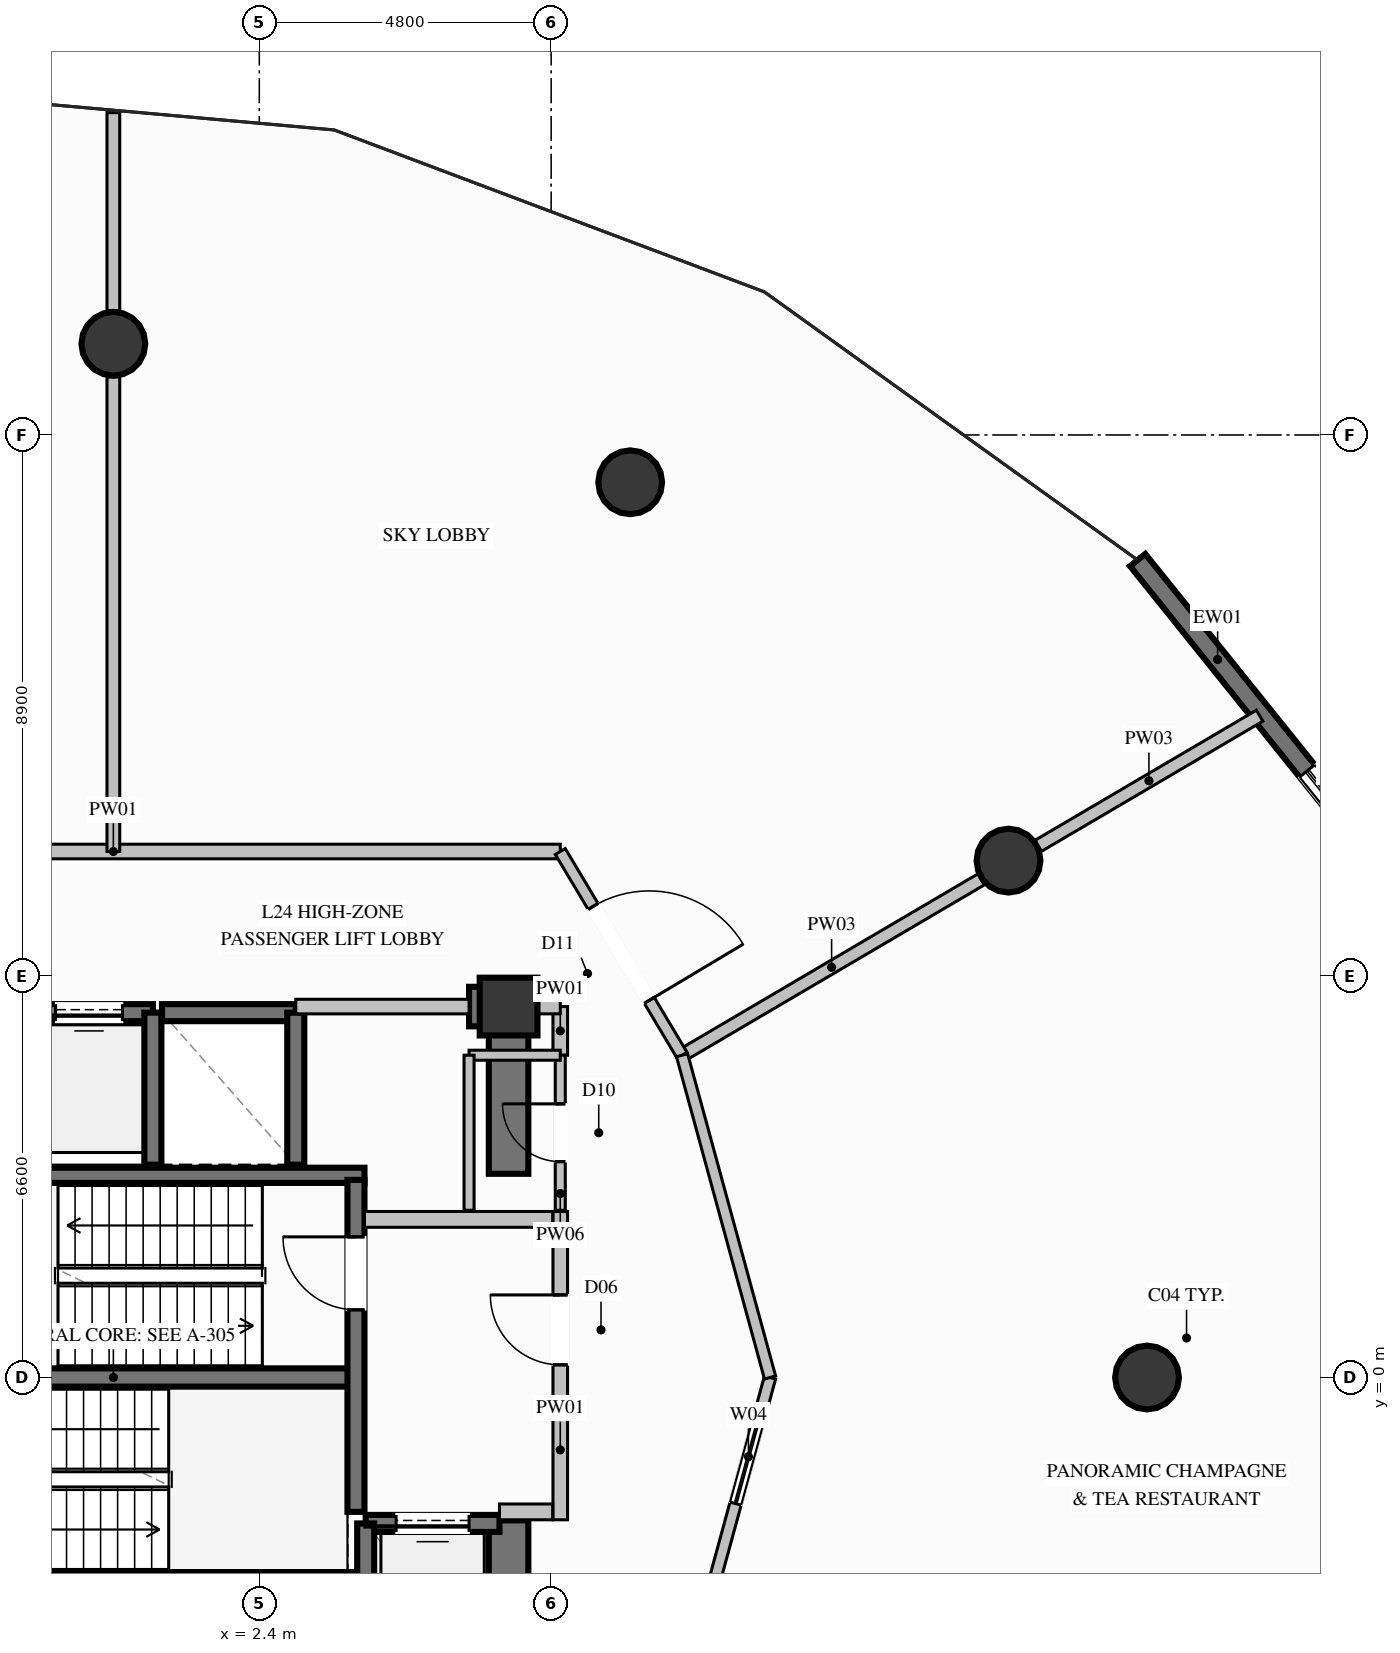
"""IFC4 building model, lengths in metres.
Left out: names, types, materials, properties, quantities, classifications, styles, units other than length and angle.
Written with IfcOpenShell. Run it as: python <this file> out.ifc"""

import sys

from ifc_helpers import new_model, si_unit, direction, frame, frame_2d, origin, origin_2d, place, context, subcontext, project, spatial, rectangle, circle, extrude, element, fill, save


model = new_model("IFC4")
c1 = context("Model", 3, precision=1e-05, world=origin(), true_north=direction((0.0, 1.0)))
c2 = subcontext(c1, "Body", "Model", "MODEL_VIEW")
j1 = project(units=[si_unit("LENGTHUNIT", "METRE"), si_unit("PLANEANGLEUNIT", "RADIAN")], contexts=[c1])
p1 = place(None, origin())
s1 = spatial("IfcSite", under=j1, at=p1, CompositionType="ELEMENT")
p2 = place(p1, origin())
s2 = spatial("IfcBuilding", under=s1, at=p2, CompositionType="ELEMENT")
p3 = place(p2, frame((0.0, 0.0, 98.0)))
s3 = spatial("IfcBuildingStorey", under=s2, at=p3, CompositionType="ELEMENT", Elevation=98.0)
p4 = place(p3, frame((6.5, 6.1, 0.0), z_axis=(0.0, 0.0, 1.0), x_axis=(1.0, 0.0, 0.0)))
e1 = element("IfcColumn", 1, at=p4, inside=s3, PredefinedType="COLUMN", context=c2, shape_type="SweptSolid", body=[
    extrude(rectangle(XDim=0.95, YDim=0.95, at=origin_2d()), origin(), (0.0, 0.0, 1.0), 4.6),
])
p5 = place(p3, frame((-3.99, 0.0, 0.0), z_axis=(0.0, 0.0, 1.0), x_axis=(1.0, 0.0, 0.0)))
e2 = element("IfcWall", 2, at=p5, inside=s3, PredefinedType="SHEAR", context=c2, shape_type="SweptSolid", body=[
    extrude(rectangle(XDim=7.98, YDim=0.3, at=frame_2d((3.99, 0.0))), origin(), (0.0, 0.0, 1.0), 4.6),
])
for number, where, z_axis, x_axis in (
    (3, (-4.13, -3.325, 0.0), (0.0, 0.0, 1.0), (1.0, 0.0, 0.0)),
    (4, (-4.13, 3.325, 0.0), (0.0, 0.0, 1.0), (1.0, 0.0, 0.0)),
):
    element("IfcWall", number, at=place(p3, frame(where, z_axis=z_axis, x_axis=x_axis)), inside=s3, PredefinedType="SOLIDWALL", context=c2, shape_type="SweptSolid", body=[
        extrude(rectangle(XDim=8.26, YDim=0.25, at=frame_2d((4.13, 0.0))), origin(), (0.0, 0.0, 1.0), 4.6),
    ])
p6 = place(p3, frame((5.85, 6.1, 0.0), z_axis=(0.0, 0.0, 1.0), x_axis=(1.0, 0.0, 0.0)))
e5 = element("IfcWall", 5, at=p6, inside=s3, PredefinedType="SHEAR", context=c2, shape_type="SweptSolid", body=[
    extrude(rectangle(XDim=0.325, YDim=0.65, at=frame_2d((0.163, 0.0))), origin(), (0.0, 0.0, 1.0), 4.6),
])
p7 = place(p3, frame((6.5, -6.425, 0.0), z_axis=(0.0, 0.0, 1.0), x_axis=(0.0, 1.0, 0.0)))
e6 = element("IfcWall", 6, at=p7, inside=s3, PredefinedType="SHEAR", context=c2, shape_type="SweptSolid", body=[
    extrude(rectangle(XDim=4.075, YDim=0.65, at=frame_2d((2.038, 0.0))), origin(), (0.0, 0.0, 1.0), 4.6),
])
p8 = place(p3, frame((6.5, 3.35, 0.0), z_axis=(0.0, 0.0, 1.0), x_axis=(0.0, 1.0, 0.0)))
e7 = element("IfcWall", 7, at=p8, inside=s3, PredefinedType="SHEAR", context=c2, shape_type="SweptSolid", body=[
    extrude(rectangle(XDim=3.075, YDim=0.65, at=frame_2d((1.538, 0.0))), origin(), (0.0, 0.0, 1.0), 4.6),
])
for number, where, z_axis, x_axis in (
    (8, (17.0, 0.0, 0.0), (0.0, 0.0, 1.0), (1.0, 0.0, 0.0)),
    (9, (14.722, 8.5, 0.0), (0.0, 0.0, 1.0), (1.0, 0.0, 0.0)),
    (10, (8.5, 14.722, 0.0), (0.0, 0.0, 1.0), (1.0, 0.0, 0.0)),
    (11, (0.0, 17.0, 0.0), (0.0, 0.0, 1.0), (1.0, 0.0, 0.0)),
):
    element("IfcColumn", number, at=place(p3, frame(where, z_axis=z_axis, x_axis=x_axis)), inside=s3, PredefinedType="COLUMN", context=c2, shape_type="SweptSolid", body=[
        extrude(circle(Radius=0.525, at=origin_2d()), origin(), (0.0, 0.0, 1.0), 4.6),
    ])
p9 = place(p3, frame((16.846, 13.443, 0.0), z_axis=(0.0, 0.0, 1.0), x_axis=(0.626452409109, -0.77945967126, 0.0)))
e12 = element("IfcWall", 12, at=p9, inside=s3, PredefinedType="SOLIDWALL", context=c2, shape_type="SweptSolid", body=[
    extrude(rectangle(XDim=7.346, YDim=0.32, at=frame_2d((3.673, 0.0))), origin(), (0.0, 0.0, 1.0), 4.35),
])
p10 = place(p9, frame((4.449, 0.0, 0.6)))
e13 = element("IfcOpeningElement", 13, at=p10, cuts=e12, PredefinedType="OPENING", context=c2, shape_type="SweptSolid", body=[
    extrude(rectangle(XDim=1.8, YDim=2.2, at=frame_2d((0.9, 1.1))), frame((0.0, 0.17, 0.0), z_axis=(0.0, -1.0, 0.0), x_axis=(1.0, 0.0, 0.0)), (0.0, 0.0, 1.0), 0.34),
])
p11 = place(p3, frame((0.65, 6.0, 0.0), z_axis=(0.0, 0.0, 1.0), x_axis=(-1.0, 0.0, 0.0)))
e14 = element("IfcWall", 14, at=p11, inside=s3, PredefinedType="SOLIDWALL", context=c2, shape_type="SweptSolid", body=[
    extrude(rectangle(XDim=2.1, YDim=0.28, at=frame_2d((1.05, 0.0))), origin(), (0.0, 0.0, 1.0), 4.35),
])
p12 = place(p11, frame((0.5, 0.0, 0.0)))
e15 = element("IfcOpeningElement", 15, at=p12, cuts=e14, PredefinedType="OPENING", context=c2, shape_type="SweptSolid", body=[
    extrude(rectangle(XDim=1.1, YDim=2.2, at=frame_2d((0.55, 1.1))), frame((0.0, 0.15, 0.0), z_axis=(0.0, -1.0, 0.0), x_axis=(1.0, 0.0, 0.0)), (0.0, 0.0, 1.0), 0.3),
])
p13 = place(p3, frame((0.65, 3.5, 0.0), z_axis=(0.0, 0.0, 1.0), x_axis=(0.0, 1.0, 0.0)))
e16 = element("IfcWall", 16, at=p13, inside=s3, PredefinedType="SOLIDWALL", context=c2, shape_type="SweptSolid", body=[
    extrude(rectangle(XDim=2.5, YDim=0.28, at=frame_2d((1.25, 0.0))), origin(), (0.0, 0.0, 1.0), 4.35),
])
p14 = place(p3, frame((3.0, 6.0, 0.0), z_axis=(0.0, 0.0, 1.0), x_axis=(-1.0, 0.0, 0.0)))
e17 = element("IfcWall", 17, at=p14, inside=s3, PredefinedType="SOLIDWALL", context=c2, shape_type="SweptSolid", body=[
    extrude(rectangle(XDim=2.2, YDim=0.28, at=frame_2d((1.1, 0.0))), origin(), (0.0, 0.0, 1.0), 4.35),
])
p15 = place(p3, frame((3.0, 3.5, 0.0), z_axis=(0.0, 0.0, 1.0), x_axis=(0.0, 1.0, 0.0)))
e18 = element("IfcWall", 18, at=p15, inside=s3, PredefinedType="SOLIDWALL", context=c2, shape_type="SweptSolid", body=[
    extrude(rectangle(XDim=2.5, YDim=0.28, at=frame_2d((1.25, 0.0))), origin(), (0.0, 0.0, 1.0), 4.35),
])
p16 = place(p3, frame((6.35, -2.4, 0.0), z_axis=(0.0, 0.0, 1.0), x_axis=(-1.0, 0.0, 0.0)))
e19 = element("IfcWall", 19, at=p16, inside=s3, PredefinedType="SOLIDWALL", context=c2, shape_type="SweptSolid", body=[
    extrude(rectangle(XDim=2.2, YDim=0.28, at=frame_2d((1.1, 0.0))), origin(), (0.0, 0.0, 1.0), 4.35),
])
p17 = place(p16, frame((0.5, 0.0, 0.0)))
e20 = element("IfcOpeningElement", 20, at=p17, cuts=e19, PredefinedType="OPENING", context=c2, shape_type="SweptSolid", body=[
    extrude(rectangle(XDim=1.2, YDim=2.2, at=frame_2d((0.6, 1.1))), frame((0.0, 0.15, 0.0), z_axis=(0.0, -1.0, 0.0), x_axis=(1.0, 0.0, 0.0)), (0.0, 0.0, 1.0), 0.3),
])
p18 = place(p3, frame((4.15, -2.4, 0.0), z_axis=(0.0, 0.0, 1.0), x_axis=(0.0, -1.0, 0.0)))
e21 = element("IfcWall", 21, at=p18, inside=s3, PredefinedType="SOLIDWALL", context=c2, shape_type="SweptSolid", body=[
    extrude(rectangle(XDim=2.7, YDim=0.28, at=frame_2d((1.35, 0.0))), origin(), (0.0, 0.0, 1.0), 4.35),
])
p19 = place(p3, frame((3.99, -2.21, 0.0), z_axis=(0.0, 0.0, 1.0), x_axis=(0.0, 1.0, 0.0)))
e22 = element("IfcWall", 22, at=p19, inside=s3, PredefinedType="SOLIDWALL", context=c2, shape_type="SweptSolid", body=[
    extrude(rectangle(XDim=5.46, YDim=0.28, at=frame_2d((2.73, 0.0))), origin(), (0.0, 0.0, 1.0), 4.35),
])
p20 = place(p19, frame((3.323, 0.0, 0.0)))
e23 = element("IfcOpeningElement", 23, at=p20, cuts=e22, PredefinedType="OPENING", context=c2, shape_type="SweptSolid", body=[
    extrude(rectangle(XDim=1.2, YDim=2.2, at=frame_2d((0.6, 1.1))), frame((0.0, 0.15, 0.0), z_axis=(0.0, -1.0, 0.0), x_axis=(1.0, 0.0, 0.0)), (0.0, 0.0, 1.0), 0.3),
])
p21 = place(p3, frame((7.35, -2.34, 0.0), z_axis=(0.0, 0.0, 1.0), x_axis=(0.0, 1.0, 0.0)))
e24 = element("IfcWall", 24, at=p21, inside=s3, PredefinedType="PARTITIONING", context=c2, shape_type="SweptSolid", body=[
    extrude(rectangle(XDim=5.07, YDim=0.24, at=frame_2d((2.535, 0.0))), origin(), (0.0, 0.0, 1.0), 3.235),
])
p22 = place(p21, frame((2.548, 0.0, 0.0)))
e25 = element("IfcOpeningElement", 25, at=p22, cuts=e24, PredefinedType="OPENING", context=c2, shape_type="SweptSolid", body=[
    extrude(rectangle(XDim=1.15, YDim=2.2, at=frame_2d((0.575, 1.1))), frame((0.0, 0.13, 0.0), z_axis=(0.0, -1.0, 0.0), x_axis=(1.0, 0.0, 0.0)), (0.0, 0.0, 1.0), 0.26),
])
p23 = place(p3, frame((6.35, -2.21, 0.0), z_axis=(0.0, 0.0, 1.0), x_axis=(1.0, 0.0, 0.0)))
e26 = element("IfcWall", 26, at=p23, inside=s3, PredefinedType="PARTITIONING", context=c2, shape_type="SweptSolid", body=[
    extrude(rectangle(XDim=0.875, YDim=0.26, at=frame_2d((0.438, 0.0))), origin(), (0.0, 0.0, 1.0), 4.35),
])
p24 = place(p3, frame((4.13, 2.6, 0.0), z_axis=(0.0, 0.0, 1.0), x_axis=(1.0, 0.0, 0.0)))
e27 = element("IfcWall", 27, at=p24, inside=s3, PredefinedType="PARTITIONING", context=c2, shape_type="SweptSolid", body=[
    extrude(rectangle(XDim=3.095, YDim=0.26, at=frame_2d((1.548, 0.0))), origin(), (0.0, 0.0, 1.0), 4.35),
])
p25 = place(p3, frame((-7.35, 8.65, 0.0), z_axis=(0.0, 0.0, 1.0), x_axis=(1.0, 0.0, 0.0)))
e28 = element("IfcWall", 28, at=p25, inside=s3, PredefinedType="PARTITIONING", context=c2, shape_type="SweptSolid", body=[
    extrude(rectangle(XDim=14.7, YDim=0.24, at=frame_2d((7.35, 0.0))), origin(), (0.0, 0.0, 1.0), 4.35),
])
p26 = place(p3, frame((3.0, 6.1, 0.0), z_axis=(0.0, 0.0, 1.0), x_axis=(1.0, 0.0, 0.0)))
e29 = element("IfcWall", 29, at=p26, inside=s3, PredefinedType="PARTITIONING", context=c2, shape_type="SweptSolid", body=[
    extrude(rectangle(XDim=2.85, YDim=0.24, at=frame_2d((1.425, 0.0))), origin(), (0.0, 0.0, 1.0), 3.235),
])
p27 = place(p3, frame((7.35, 5.3, 0.0), z_axis=(0.0, 0.0, 1.0), x_axis=(0.0, 1.0, 0.0)))
e30 = element("IfcWall", 30, at=p27, inside=s3, PredefinedType="PARTITIONING", context=c2, shape_type="SweptSolid", body=[
    extrude(rectangle(XDim=0.8, YDim=0.24, at=frame_2d((0.4, 0.0))), origin(), (0.0, 0.0, 1.0), 3.235),
])
p28 = place(p3, frame((6.5, 6.1, 0.0), z_axis=(0.0, 0.0, 1.0), x_axis=(1.0, 0.0, 0.0)))
e31 = element("IfcWall", 31, at=p28, inside=s3, PredefinedType="PARTITIONING", context=c2, shape_type="SweptSolid", body=[
    extrude(rectangle(XDim=0.85, YDim=0.24, at=frame_2d((0.425, 0.0))), origin(), (0.0, 0.0, 1.0), 3.718),
])
p29 = place(p3, frame((7.35, 2.75, 0.0), z_axis=(0.0, 0.0, 1.0), x_axis=(0.0, 1.0, 0.0)))
e32 = element("IfcWall", 32, at=p29, inside=s3, PredefinedType="PARTITIONING", context=c2, shape_type="SweptSolid", body=[
    extrude(rectangle(XDim=2.55, YDim=0.165, at=frame_2d((1.275, 0.0))), origin(), (0.0, 0.0, 1.0), 3.235),
])
p30 = place(p29, frame((0.8, 0.0, 0.0)))
e33 = element("IfcOpeningElement", 33, at=p30, cuts=e32, PredefinedType="OPENING", context=c2, shape_type="SweptSolid", body=[
    extrude(rectangle(XDim=0.95, YDim=2.1, at=frame_2d((0.475, 1.05))), frame((0.0, 0.093, 0.0), z_axis=(0.0, -1.0, 0.0), x_axis=(1.0, 0.0, 0.0)), (0.0, 0.0, 1.0), 0.185),
])
p31 = place(p3, frame((7.35, 5.3, 0.0), z_axis=(0.0, 0.0, 1.0), x_axis=(-1.0, 0.0, 0.0)))
e34 = element("IfcWall", 34, at=p31, inside=s3, PredefinedType="PARTITIONING", context=c2, shape_type="SweptSolid", body=[
    extrude(rectangle(XDim=1.5, YDim=0.165, at=frame_2d((0.75, 0.0))), origin(), (0.0, 0.0, 1.0), 3.235),
])
p32 = place(p3, frame((5.85, 5.3, 0.0), z_axis=(0.0, 0.0, 1.0), x_axis=(0.0, -1.0, 0.0)))
e35 = element("IfcWall", 35, at=p32, inside=s3, PredefinedType="PARTITIONING", context=c2, shape_type="SweptSolid", body=[
    extrude(rectangle(XDim=2.55, YDim=0.165, at=frame_2d((1.275, 0.0))), origin(), (0.0, 0.0, 1.0), 3.235),
])
p33 = place(p3, frame((9.353, 5.3, 0.0), z_axis=(0.0, 0.0, 1.0), x_axis=(0.862060677735, 0.506805078805, 0.0)))
e36 = element("IfcWall", 36, at=p33, inside=s3, PredefinedType="PARTITIONING", context=c2, shape_type="SweptSolid", body=[
    extrude(rectangle(XDim=5.706, YDim=0.21, at=frame_2d((2.853, 0.0))), origin(), (0.0, 0.0, 1.0), 3.718),
])
p34 = place(p3, frame((15.21, 8.743, 0.0), z_axis=(0.0, 0.0, 1.0), x_axis=(0.86206788284, 0.506792822932, 0.0)))
e37 = element("IfcWall", 37, at=p34, inside=s3, PredefinedType="PARTITIONING", context=c2, shape_type="SweptSolid", body=[
    extrude(rectangle(XDim=4.225, YDim=0.21, at=frame_2d((2.112, 0.0))), origin(), (0.0, 0.0, 1.0), 4.35),
])
p35 = place(p3, frame((7.35, 8.65, 0.0), z_axis=(0.0, 0.0, 1.0), x_axis=(0.513179710324, -0.858281180565, 0.0)))
e38 = element("IfcWall", 38, at=p35, inside=s3, PredefinedType="PARTITIONING", context=c2, shape_type="SweptSolid", body=[
    extrude(rectangle(XDim=3.903, YDim=0.19, at=frame_2d((1.952, 0.0))), origin(), (0.0, 0.0, 1.0), 4.35),
])
p36 = place(p35, frame((1.052, 0.0, 0.0)))
e39 = element("IfcOpeningElement", 39, at=p36, cuts=e38, PredefinedType="OPENING", context=c2, shape_type="SweptSolid", body=[
    extrude(rectangle(XDim=1.8, YDim=2.4, at=frame_2d((0.9, 1.2))), frame((0.0, 0.105, 0.0), z_axis=(0.0, -1.0, 0.0), x_axis=(1.0, 0.0, 0.0)), (0.0, 0.0, 1.0), 0.21),
])
p37 = place(p3, frame((0.0, 8.65, 0.0), z_axis=(0.0, 0.0, 1.0), x_axis=(0.0, 1.0, 0.0)))
e40 = element("IfcWall", 40, at=p37, inside=s3, PredefinedType="PARTITIONING", context=c2, shape_type="SweptSolid", body=[
    extrude(rectangle(XDim=7.805, YDim=0.21, at=frame_2d((3.903, 0.0))), origin(), (0.0, 0.0, 1.0), 4.35),
])
p38 = place(p3, frame((0.0, 17.545, 0.0), z_axis=(0.0, 0.0, 1.0), x_axis=(0.0, 1.0, 0.0)))
e41 = element("IfcWall", 41, at=p38, inside=s3, PredefinedType="PARTITIONING", context=c2, shape_type="SweptSolid", body=[
    extrude(rectangle(XDim=3.256, YDim=0.21, at=frame_2d((1.628, 0.0))), origin(), (0.0, 0.0, 1.0), 4.35),
])
p39 = place(p3, frame((9.353, -5.3, 0.0), z_axis=(0.0, 0.0, 1.0), x_axis=(0.263380602271, 0.964692001805, 0.0)))
e42 = element("IfcWall", 42, at=p39, inside=s3, PredefinedType="PARTITIONING", context=c2, shape_type="SweptSolid", body=[
    extrude(rectangle(XDim=5.494, YDim=0.19, at=frame_2d((2.747, 0.0))), origin(), (0.0, 0.0, 1.0), 4.35),
])
p40 = place(p39, frame((0.55, 0.0, 0.0)))
e43 = element("IfcOpeningElement", 43, at=p40, cuts=e42, PredefinedType="OPENING", context=c2, shape_type="SweptSolid", body=[
    extrude(rectangle(XDim=0.95, YDim=2.1, at=frame_2d((0.475, 1.05))), frame((0.0, 0.105, 0.0), z_axis=(0.0, -1.0, 0.0), x_axis=(1.0, 0.0, 0.0)), (0.0, 0.0, 1.0), 0.21),
])
p41 = place(p39, frame((3.344, 0.0, 0.9)))
e44 = element("IfcOpeningElement", 44, at=p41, cuts=e42, PredefinedType="OPENING", context=c2, shape_type="SweptSolid", body=[
    extrude(rectangle(XDim=1.6, YDim=1.4, at=frame_2d((0.8, 0.7))), frame((0.0, 0.105, 0.0), z_axis=(0.0, -1.0, 0.0), x_axis=(1.0, 0.0, 0.0)), (0.0, 0.0, 1.0), 0.21),
])
p42 = place(p3, frame((10.8, 0.0, 0.0), z_axis=(0.0, 0.0, 1.0), x_axis=(-0.263380602271, 0.964692001805, 0.0)))
e45 = element("IfcWall", 45, at=p42, inside=s3, PredefinedType="PARTITIONING", context=c2, shape_type="SweptSolid", body=[
    extrude(rectangle(XDim=5.494, YDim=0.19, at=frame_2d((2.747, 0.0))), origin(), (0.0, 0.0, 1.0), 4.35),
])
p43 = place(p10, origin())
e46 = element("IfcWindow", 46, at=p43, inside=s3, PartitioningType="SINGLE_PANEL", PredefinedType="SKYLIGHT", context=c2, shape_type="SweptSolid", body=[
    extrude(rectangle(XDim=1.8, YDim=2.2, at=frame_2d((0.9, 1.1))), frame((0.0, 0.03, 0.0), z_axis=(0.0, -1.0, 0.0), x_axis=(1.0, 0.0, 0.0)), (0.0, 0.0, 1.0), 0.06),
])
fill(e13, e46)
p44 = place(p12, origin())
e47 = element("IfcDoor", 47, at=p44, inside=s3, OperationType="SLIDING_TO_LEFT", PredefinedType="DOOR", context=c2, shape_type="SweptSolid", body=[
    extrude(rectangle(XDim=1.1, YDim=2.2, at=frame_2d((0.55, 1.1))), frame((0.0, 0.025, 0.0), z_axis=(0.0, -1.0, 0.0), x_axis=(1.0, 0.0, 0.0)), (0.0, 0.0, 1.0), 0.05),
])
fill(e15, e47)
p45 = place(p17, origin())
e48 = element("IfcDoor", 48, at=p45, inside=s3, OperationType="SLIDING_TO_LEFT", PredefinedType="DOOR", context=c2, shape_type="SweptSolid", body=[
    extrude(rectangle(XDim=1.2, YDim=2.2, at=frame_2d((0.6, 1.1))), frame((0.0, 0.025, 0.0), z_axis=(0.0, -1.0, 0.0), x_axis=(1.0, 0.0, 0.0)), (0.0, 0.0, 1.0), 0.05),
])
fill(e20, e48)
p46 = place(p20, origin())
e49 = element("IfcDoor", 49, at=p46, inside=s3, OperationType="SINGLE_SWING_RIGHT", PredefinedType="DOOR", context=c2, shape_type="SweptSolid", body=[
    extrude(rectangle(XDim=1.2, YDim=2.2, at=frame_2d((0.6, 1.1))), frame((0.0, 0.025, 0.0), z_axis=(0.0, -1.0, 0.0), x_axis=(1.0, 0.0, 0.0)), (0.0, 0.0, 1.0), 0.05),
])
fill(e23, e49)
p47 = place(p22, origin())
e50 = element("IfcDoor", 50, at=p47, inside=s3, OperationType="SINGLE_SWING_RIGHT", PredefinedType="DOOR", context=c2, shape_type="SweptSolid", body=[
    extrude(rectangle(XDim=1.15, YDim=2.2, at=frame_2d((0.575, 1.1))), frame((0.0, 0.025, 0.0), z_axis=(0.0, -1.0, 0.0), x_axis=(1.0, 0.0, 0.0)), (0.0, 0.0, 1.0), 0.05),
])
fill(e25, e50)
p48 = place(p30, origin())
e51 = element("IfcDoor", 51, at=p48, inside=s3, OperationType="SINGLE_SWING_RIGHT", PredefinedType="DOOR", context=c2, shape_type="SweptSolid", body=[
    extrude(rectangle(XDim=0.95, YDim=2.1, at=frame_2d((0.475, 1.05))), frame((0.0, 0.025, 0.0), z_axis=(0.0, -1.0, 0.0), x_axis=(1.0, 0.0, 0.0)), (0.0, 0.0, 1.0), 0.05),
])
fill(e33, e51)
p49 = place(p36, origin())
e52 = element("IfcDoor", 52, at=p49, inside=s3, OperationType="SINGLE_SWING_RIGHT", PredefinedType="DOOR", context=c2, shape_type="SweptSolid", body=[
    extrude(rectangle(XDim=1.8, YDim=2.4, at=frame_2d((0.9, 1.2))), frame((0.0, 0.025, 0.0), z_axis=(0.0, -1.0, 0.0), x_axis=(1.0, 0.0, 0.0)), (0.0, 0.0, 1.0), 0.05),
])
fill(e39, e52)
p50 = place(p41, origin())
e53 = element("IfcWindow", 53, at=p50, inside=s3, PartitioningType="SINGLE_PANEL", PredefinedType="WINDOW", context=c2, shape_type="SweptSolid", body=[
    extrude(rectangle(XDim=1.6, YDim=1.4, at=frame_2d((0.8, 0.7))), frame((0.0, 0.03, 0.0), z_axis=(0.0, -1.0, 0.0), x_axis=(1.0, 0.0, 0.0)), (0.0, 0.0, 1.0), 0.06),
])
fill(e44, e53)
save(model, sys.argv[1])
